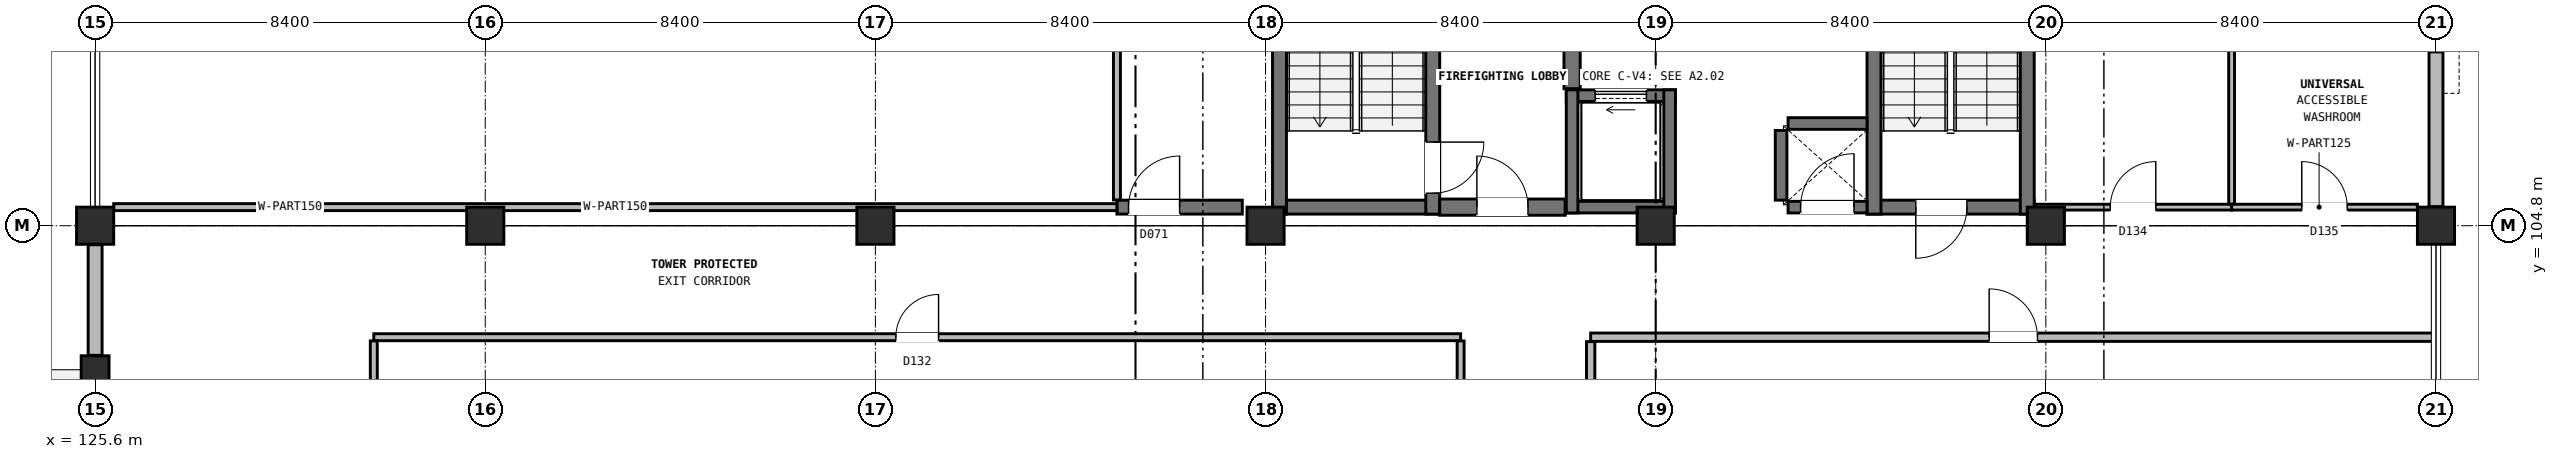
"""IFC4 building model, lengths in metres.
Left out: names, types, materials, properties, quantities, classifications, styles, units other than length and angle.
Written with IfcOpenShell. Run it as: python <this file> out.ifc"""

import sys

from ifc_helpers import new_model, si_unit, direction, frame, frame_2d, origin, origin_2d, place, context, subcontext, project, spatial, rectangle, extrude, element, fill, save


model = new_model("IFC4")
c1 = context("Model", 3, precision=1e-05, world=origin(), true_north=direction((0.0, 1.0)))
c2 = subcontext(c1, "Body", "Model", "MODEL_VIEW")
j1 = project(units=[si_unit("LENGTHUNIT", "METRE"), si_unit("PLANEANGLEUNIT", "RADIAN")], contexts=[c1])
p1 = place(None, origin())
s1 = spatial("IfcSite", under=j1, at=p1, CompositionType="ELEMENT")
p2 = place(p1, origin())
s2 = spatial("IfcBuilding", under=s1, at=p2, CompositionType="ELEMENT")
p3 = place(p2, origin())
s3 = spatial("IfcBuildingStorey", under=s2, at=p3, CompositionType="ELEMENT", Elevation=0.0)
for number, where, z_axis, x_axis in (
    (1, (125.6, 104.8, 0.0), (0.0, 0.0, 1.0), (1.0, 0.0, 0.0)),
    (2, (134.0, 104.8, 0.0), (0.0, 0.0, 1.0), (1.0, 0.0, 0.0)),
    (3, (142.4, 104.8, 0.0), (0.0, 0.0, 1.0), (1.0, 0.0, 0.0)),
    (4, (150.8, 104.8, 0.0), (0.0, 0.0, 1.0), (1.0, 0.0, 0.0)),
    (5, (159.2, 104.8, 0.0), (0.0, 0.0, 1.0), (1.0, 0.0, 0.0)),
    (6, (167.6, 104.8, 0.0), (0.0, 0.0, 1.0), (1.0, 0.0, 0.0)),
    (7, (176.0, 104.8, 0.0), (0.0, 0.0, 1.0), (1.0, 0.0, 0.0)),
):
    element("IfcColumn", number, at=place(p3, frame(where, z_axis=z_axis, x_axis=x_axis)), inside=s3, PredefinedType="COLUMN", context=c2, shape_type="SweptSolid", body=[
        extrude(rectangle(XDim=0.8, YDim=0.8, at=origin_2d()), origin(), (0.0, 0.0, 1.0), 4.8),
    ])
p4 = place(p3, frame((125.6, 101.7, 0.0), z_axis=(0.0, 0.0, 1.0), x_axis=(1.0, 0.0, 0.0)))
e8 = element("IfcColumn", 8, at=p4, inside=s3, PredefinedType="COLUMN", context=c2, shape_type="SweptSolid", body=[
    extrude(rectangle(XDim=0.6, YDim=0.6, at=origin_2d()), origin(), (0.0, 0.0, 1.0), 4.8),
])
p5 = place(p3, frame((176.0, 105.21, 0.0), z_axis=(0.0, 0.0, 1.0), x_axis=(0.0, 1.0, 0.0)))
e9 = element("IfcWall", 9, at=p5, inside=s3, PredefinedType="SOLIDWALL", context=c2, shape_type="SweptSolid", body=[
    extrude(rectangle(XDim=7.98, YDim=0.3, at=frame_2d((3.99, 0.0))), origin(), (0.0, 0.0, 1.0), 4.05),
])
p6 = place(p5, frame((3.315, 0.0, 0.9)))
e10 = element("IfcOpeningElement", 10, at=p6, cuts=e9, PredefinedType="OPENING", context=c2, shape_type="SweptSolid", body=[
    extrude(rectangle(XDim=1.35, YDim=1.8, at=frame_2d((0.675, 0.9))), frame((0.0, 0.16, 0.0), z_axis=(0.0, -1.0, 0.0), x_axis=(1.0, 0.0, 0.0)), (0.0, 0.0, 1.0), 0.32),
])
p7 = place(p3, frame((125.6, 104.39, 0.0), z_axis=(0.0, 0.0, 1.0), x_axis=(0.0, -1.0, 0.0)))
e11 = element("IfcWall", 11, at=p7, inside=s3, PredefinedType="SOLIDWALL", context=c2, shape_type="SweptSolid", body=[
    extrude(rectangle(XDim=2.38, YDim=0.3, at=frame_2d((1.19, 0.0))), origin(), (0.0, 0.0, 1.0), 4.05),
])
p8 = place(p3, frame((150.95, 105.2, 0.0), z_axis=(0.0, 0.0, 1.0), x_axis=(1.0, 0.0, 0.0)))
e12 = element("IfcWall", 12, at=p8, inside=s3, PredefinedType="SHEAR", context=c2, shape_type="SweptSolid", body=[
    extrude(rectangle(XDim=3.6, YDim=0.3, at=frame_2d((1.8, 0.0))), origin(), (0.0, 0.0, 1.0), 4.8),
])
p9 = place(p3, frame((151.1, 105.05, 0.0), z_axis=(0.0, 0.0, 1.0), x_axis=(0.0, 1.0, 0.0)))
e13 = element("IfcWall", 13, at=p9, inside=s3, PredefinedType="SHEAR", context=c2, shape_type="SweptSolid", body=[
    extrude(rectangle(XDim=8.3, YDim=0.3, at=frame_2d((4.15, 0.0))), origin(), (0.0, 0.0, 1.0), 4.8),
])
p10 = place(p3, frame((154.4, 105.05, 0.0), z_axis=(0.0, 0.0, 1.0), x_axis=(0.0, 1.0, 0.0)))
e14 = element("IfcWall", 14, at=p10, inside=s3, PredefinedType="SHEAR", context=c2, shape_type="SweptSolid", body=[
    extrude(rectangle(XDim=8.3, YDim=0.3, at=frame_2d((4.15, 0.0))), origin(), (0.0, 0.0, 1.0), 4.8),
])
p11 = place(p10, frame((0.45, 0.0, 0.0)))
e15 = element("IfcOpeningElement", 15, at=p11, cuts=e14, PredefinedType="OPENING", context=c2, shape_type="SweptSolid", body=[
    extrude(rectangle(XDim=1.1, YDim=2.2, at=frame_2d((0.55, 1.1))), frame((0.0, 0.16, 0.0), z_axis=(0.0, -1.0, 0.0), x_axis=(1.0, 0.0, 0.0)), (0.0, 0.0, 1.0), 0.32),
])
p12 = place(p3, frame((163.75, 105.2, 0.0), z_axis=(0.0, 0.0, 1.0), x_axis=(1.0, 0.0, 0.0)))
e16 = element("IfcWall", 16, at=p12, inside=s3, PredefinedType="SHEAR", context=c2, shape_type="SweptSolid", body=[
    extrude(rectangle(XDim=3.6, YDim=0.3, at=frame_2d((1.8, 0.0))), origin(), (0.0, 0.0, 1.0), 4.8),
])
p13 = place(p12, frame((1.05, 0.0, 0.0)))
e17 = element("IfcOpeningElement", 17, at=p13, cuts=e16, PredefinedType="OPENING", context=c2, shape_type="SweptSolid", body=[
    extrude(rectangle(XDim=1.1, YDim=2.2, at=frame_2d((0.55, 1.1))), frame((0.0, 0.16, 0.0), z_axis=(0.0, -1.0, 0.0), x_axis=(1.0, 0.0, 0.0)), (0.0, 0.0, 1.0), 0.32),
])
for number, where, z_axis, x_axis in (
    (18, (163.9, 105.05, 0.0), (0.0, 0.0, 1.0), (0.0, 1.0, 0.0)),
    (19, (167.2, 105.05, 0.0), (0.0, 0.0, 1.0), (0.0, 1.0, 0.0)),
):
    element("IfcWall", number, at=place(p3, frame(where, z_axis=z_axis, x_axis=x_axis)), inside=s3, PredefinedType="SHEAR", context=c2, shape_type="SweptSolid", body=[
        extrude(rectangle(XDim=8.3, YDim=0.3, at=frame_2d((4.15, 0.0))), origin(), (0.0, 0.0, 1.0), 4.8),
    ])
p14 = place(p3, frame((157.275, 105.2, 0.0), z_axis=(0.0, 0.0, 1.0), x_axis=(1.0, 0.0, 0.0)))
e20 = element("IfcWall", 20, at=p14, inside=s3, PredefinedType="SOLIDWALL", context=c2, shape_type="SweptSolid", body=[
    extrude(rectangle(XDim=2.35, YDim=0.25, at=frame_2d((1.175, 0.0))), origin(), (0.0, 0.0, 1.0), 4.48),
])
p15 = place(p3, frame((157.275, 107.6, 0.0), z_axis=(0.0, 0.0, 1.0), x_axis=(1.0, 0.0, 0.0)))
e21 = element("IfcWall", 21, at=p15, inside=s3, PredefinedType="SOLIDWALL", context=c2, shape_type="SweptSolid", body=[
    extrude(rectangle(XDim=2.35, YDim=0.25, at=frame_2d((1.175, 0.0))), origin(), (0.0, 0.0, 1.0), 4.48),
])
p16 = place(p15, frame((0.625, 0.0, 0.0)))
e22 = element("IfcOpeningElement", 22, at=p16, cuts=e21, PredefinedType="OPENING", context=c2, shape_type="SweptSolid", body=[
    extrude(rectangle(XDim=1.1, YDim=2.2, at=frame_2d((0.55, 1.1))), frame((0.0, 0.135, 0.0), z_axis=(0.0, -1.0, 0.0), x_axis=(1.0, 0.0, 0.0)), (0.0, 0.0, 1.0), 0.27),
])
for number, where, z_axis, x_axis in (
    (23, (157.4, 105.075, 0.0), (0.0, 0.0, 1.0), (0.0, 1.0, 0.0)),
    (24, (159.5, 105.075, 0.0), (0.0, 0.0, 1.0), (0.0, 1.0, 0.0)),
):
    element("IfcWall", number, at=place(p3, frame(where, z_axis=z_axis, x_axis=x_axis)), inside=s3, PredefinedType="SOLIDWALL", context=c2, shape_type="SweptSolid", body=[
        extrude(rectangle(XDim=2.65, YDim=0.25, at=frame_2d((1.325, 0.0))), origin(), (0.0, 0.0, 1.0), 4.48),
    ])
p17 = place(p3, frame((157.4, 107.75, 0.0), z_axis=(0.0, 0.0, 1.0), x_axis=(0.0, 1.0, 0.0)))
e25 = element("IfcWall", 25, at=p17, inside=s3, PredefinedType="SHEAR", context=c2, shape_type="SweptSolid", body=[
    extrude(rectangle(XDim=2.9, YDim=0.35, at=frame_2d((1.45, 0.0))), origin(), (0.0, 0.0, 1.0), 4.48),
])
p18 = place(p3, frame((154.55, 105.2, 0.0), z_axis=(0.0, 0.0, 1.0), x_axis=(1.0, 0.0, 0.0)))
e26 = element("IfcWall", 26, at=p18, inside=s3, PredefinedType="SHEAR", context=c2, shape_type="SweptSolid", body=[
    extrude(rectangle(XDim=2.7, YDim=0.35, at=frame_2d((1.35, 0.0))), origin(), (0.0, 0.0, 1.0), 4.48),
])
p19 = place(p18, frame((0.8, 0.0, 0.0)))
e27 = element("IfcOpeningElement", 27, at=p19, cuts=e26, PredefinedType="OPENING", context=c2, shape_type="SweptSolid", body=[
    extrude(rectangle(XDim=1.1, YDim=2.2, at=frame_2d((0.55, 1.1))), frame((0.0, 0.185, 0.0), z_axis=(0.0, -1.0, 0.0), x_axis=(1.0, 0.0, 0.0)), (0.0, 0.0, 1.0), 0.37),
])
p20 = place(p3, frame((161.9, 105.35, 0.0), z_axis=(0.0, 0.0, 1.0), x_axis=(0.0, 1.0, 0.0)))
e28 = element("IfcWall", 28, at=p20, inside=s3, PredefinedType="SOLIDWALL", context=c2, shape_type="SweptSolid", body=[
    extrude(rectangle(XDim=1.5, YDim=0.25, at=frame_2d((0.75, 0.0))), origin(), (0.0, 0.0, 1.0), 4.48),
])
p21 = place(p3, frame((162.05, 107.0, 0.0), z_axis=(0.0, 0.0, 1.0), x_axis=(1.0, 0.0, 0.0)))
e29 = element("IfcWall", 29, at=p21, inside=s3, PredefinedType="SOLIDWALL", context=c2, shape_type="SweptSolid", body=[
    extrude(rectangle(XDim=1.7, YDim=0.25, at=frame_2d((0.85, 0.0))), origin(), (0.0, 0.0, 1.0), 4.48),
])
p22 = place(p3, frame((162.05, 105.2, 0.0), z_axis=(0.0, 0.0, 1.0), x_axis=(1.0, 0.0, 0.0)))
e30 = element("IfcWall", 30, at=p22, inside=s3, PredefinedType="SOLIDWALL", context=c2, shape_type="SweptSolid", body=[
    extrude(rectangle(XDim=1.7, YDim=0.25, at=frame_2d((0.85, 0.0))), origin(), (0.0, 0.0, 1.0), 4.48),
])
p23 = place(p22, frame((0.27, 0.0, 0.0)))
e31 = element("IfcOpeningElement", 31, at=p23, cuts=e30, PredefinedType="OPENING", context=c2, shape_type="SweptSolid", body=[
    extrude(rectangle(XDim=1.15, YDim=2.2, at=frame_2d((0.575, 1.1))), frame((0.0, 0.135, 0.0), z_axis=(0.0, -1.0, 0.0), x_axis=(1.0, 0.0, 0.0)), (0.0, 0.0, 1.0), 0.27),
])
p24 = place(p3, frame((147.6, 105.2, 0.0), z_axis=(0.0, 0.0, 1.0), x_axis=(1.0, 0.0, 0.0)))
e32 = element("IfcWall", 32, at=p24, inside=s3, PredefinedType="SHEAR", context=c2, shape_type="SweptSolid", body=[
    extrude(rectangle(XDim=2.7, YDim=0.3, at=frame_2d((1.35, 0.0))), origin(), (0.0, 0.0, 1.0), 4.48),
])
p25 = place(p24, frame((0.25, 0.0, 0.0)))
e33 = element("IfcOpeningElement", 33, at=p25, cuts=e32, PredefinedType="OPENING", context=c2, shape_type="SweptSolid", body=[
    extrude(rectangle(XDim=1.1, YDim=2.2, at=frame_2d((0.55, 1.1))), frame((0.0, 0.16, 0.0), z_axis=(0.0, -1.0, 0.0), x_axis=(1.0, 0.0, 0.0)), (0.0, 0.0, 1.0), 0.32),
])
p26 = place(p3, frame((147.6, 105.355, 0.0), z_axis=(0.0, 0.0, 1.0), x_axis=(0.0, 1.0, 0.0)))
e34 = element("IfcWall", 34, at=p26, inside=s3, PredefinedType="PARTITIONING", context=c2, shape_type="SweptSolid", body=[
    extrude(rectangle(XDim=16.89, YDim=0.15, at=frame_2d((8.445, 0.0))), origin(), (0.0, 0.0, 1.0), 4.465),
])
p27 = place(p26, frame((7.525, 0.0, 0.0)))
e35 = element("IfcOpeningElement", 35, at=p27, cuts=e34, PredefinedType="OPENING", context=c2, shape_type="SweptSolid", body=[
    extrude(rectangle(XDim=1.84, YDim=2.38, at=frame_2d((0.92, 1.19))), frame((0.0, 0.085, 0.0), z_axis=(0.0, -1.0, 0.0), x_axis=(1.0, 0.0, 0.0)), (0.0, 0.0, 1.0), 0.17),
])
p28 = place(p3, frame((131.6, 102.4, 0.0), z_axis=(0.0, 0.0, 1.0), x_axis=(1.0, 0.0, 0.0)))
e36 = element("IfcWall", 36, at=p28, inside=s3, PredefinedType="PARTITIONING", context=c2, shape_type="SweptSolid", body=[
    extrude(rectangle(XDim=23.4, YDim=0.15, at=frame_2d((11.7, 0.0))), origin(), (0.0, 0.0, 1.0), 4.465),
])
p29 = place(p28, frame((11.24, 0.0, 0.0)))
e37 = element("IfcOpeningElement", 37, at=p29, cuts=e36, PredefinedType="OPENING", context=c2, shape_type="SweptSolid", body=[
    extrude(rectangle(XDim=0.92, YDim=2.1, at=frame_2d((0.46, 1.05))), frame((0.0, 0.085, 0.0), z_axis=(0.0, -1.0, 0.0), x_axis=(1.0, 0.0, 0.0)), (0.0, 0.0, 1.0), 0.17),
])
p30 = place(p3, frame((157.8, 102.4, 0.0), z_axis=(0.0, 0.0, 1.0), x_axis=(1.0, 0.0, 0.0)))
e38 = element("IfcWall", 38, at=p30, inside=s3, PredefinedType="PARTITIONING", context=c2, shape_type="SweptSolid", body=[
    extrude(rectangle(XDim=18.2, YDim=0.18, at=frame_2d((9.1, 0.0))), origin(), (0.0, 0.0, 1.0), 4.465),
])
p31 = place(p30, frame((8.58, 0.0, 0.0)))
e39 = element("IfcOpeningElement", 39, at=p31, cuts=e38, PredefinedType="OPENING", context=c2, shape_type="SweptSolid", body=[
    extrude(rectangle(XDim=1.04, YDim=2.15, at=frame_2d((0.52, 1.075))), frame((0.0, 0.1, 0.0), z_axis=(0.0, -1.0, 0.0), x_axis=(1.0, 0.0, 0.0)), (0.0, 0.0, 1.0), 0.2),
])
p32 = place(p3, frame((126.0, 105.2, 0.0), z_axis=(0.0, 0.0, 1.0), x_axis=(1.0, 0.0, 0.0)))
e40 = element("IfcWall", 40, at=p32, inside=s3, PredefinedType="PARTITIONING", context=c2, shape_type="SweptSolid", body=[
    extrude(rectangle(XDim=21.6, YDim=0.15, at=frame_2d((10.8, 0.0))), origin(), (0.0, 0.0, 1.0), 4.045),
])
p33 = place(p3, frame((167.355, 105.2, 0.0), z_axis=(0.0, 0.0, 1.0), x_axis=(1.0, 0.0, 0.0)))
e41 = element("IfcWall", 41, at=p33, inside=s3, PredefinedType="PARTITIONING", context=c2, shape_type="SweptSolid", body=[
    extrude(rectangle(XDim=4.245, YDim=0.125, at=frame_2d((2.123, 0.0))), origin(), (0.0, 0.0, 1.0), 4.045),
])
p34 = place(p33, frame((1.633, 0.0, 0.0)))
e42 = element("IfcOpeningElement", 42, at=p34, cuts=e41, PredefinedType="OPENING", context=c2, shape_type="SweptSolid", body=[
    extrude(rectangle(XDim=0.98, YDim=2.1, at=frame_2d((0.49, 1.05))), frame((0.0, 0.073, 0.0), z_axis=(0.0, -1.0, 0.0), x_axis=(1.0, 0.0, 0.0)), (0.0, 0.0, 1.0), 0.145),
])
p35 = place(p3, frame((171.6, 105.2, 0.0), z_axis=(0.0, 0.0, 1.0), x_axis=(1.0, 0.0, 0.0)))
e43 = element("IfcWall", 43, at=p35, inside=s3, PredefinedType="PARTITIONING", context=c2, shape_type="SweptSolid", body=[
    extrude(rectangle(XDim=4.0, YDim=0.125, at=frame_2d((2.0, 0.0))), origin(), (0.0, 0.0, 1.0), 4.045),
])
p36 = place(p35, frame((1.51, 0.0, 0.0)))
e44 = element("IfcOpeningElement", 44, at=p36, cuts=e43, PredefinedType="OPENING", context=c2, shape_type="SweptSolid", body=[
    extrude(rectangle(XDim=0.98, YDim=2.1, at=frame_2d((0.49, 1.05))), frame((0.0, 0.073, 0.0), z_axis=(0.0, -1.0, 0.0), x_axis=(1.0, 0.0, 0.0)), (0.0, 0.0, 1.0), 0.145),
])
p37 = place(p3, frame((131.6, 94.0, 0.0), z_axis=(0.0, 0.0, 1.0), x_axis=(0.0, 1.0, 0.0)))
e45 = element("IfcWall", 45, at=p37, inside=s3, PredefinedType="PARTITIONING", context=c2, shape_type="SweptSolid", body=[
    extrude(rectangle(XDim=8.32, YDim=0.15, at=frame_2d((4.16, 0.0))), origin(), (0.0, 0.0, 1.0), 4.465),
])
p38 = place(p3, frame((155.0, 87.2, 0.0), z_axis=(0.0, 0.0, 1.0), x_axis=(0.0, 1.0, 0.0)))
e46 = element("IfcWall", 46, at=p38, inside=s3, PredefinedType="PARTITIONING", context=c2, shape_type="SweptSolid", body=[
    extrude(rectangle(XDim=15.12, YDim=0.15, at=frame_2d((7.56, 0.0))), origin(), (0.0, 0.0, 1.0), 4.465),
])
p39 = place(p3, frame((157.8, 87.2, 0.0), z_axis=(0.0, 0.0, 1.0), x_axis=(0.0, 1.0, 0.0)))
e47 = element("IfcWall", 47, at=p39, inside=s3, PredefinedType="PARTITIONING", context=c2, shape_type="SweptSolid", body=[
    extrude(rectangle(XDim=15.105, YDim=0.18, at=frame_2d((7.552, 0.0))), origin(), (0.0, 0.0, 1.0), 4.465),
])
p40 = place(p3, frame((171.6, 105.268, 0.0), z_axis=(0.0, 0.0, 1.0), x_axis=(0.0, 1.0, 0.0)))
e48 = element("IfcWall", 48, at=p40, inside=s3, PredefinedType="PARTITIONING", context=c2, shape_type="SweptSolid", body=[
    extrude(rectangle(XDim=16.978, YDim=0.125, at=frame_2d((8.489, 0.0))), origin(), (0.0, 0.0, 1.0), 4.465),
])
p41 = place(p11, frame((1.1, 0.0, 0.0), z_axis=(0.0, 0.0, 1.0), x_axis=(-1.0, 0.0, 0.0)))
e49 = element("IfcDoor", 49, at=p41, inside=s3, OperationType="SINGLE_SWING_RIGHT", PredefinedType="DOOR", context=c2, shape_type="SweptSolid", body=[
    extrude(rectangle(XDim=1.1, YDim=2.2, at=frame_2d((0.55, 1.1))), frame((0.0, 0.025, 0.0), z_axis=(0.0, -1.0, 0.0), x_axis=(1.0, 0.0, 0.0)), (0.0, 0.0, 1.0), 0.05),
])
fill(e15, e49)
p42 = place(p13, frame((1.1, 0.0, 0.0), z_axis=(0.0, 0.0, 1.0), x_axis=(-1.0, 0.0, 0.0)))
e50 = element("IfcDoor", 50, at=p42, inside=s3, OperationType="SINGLE_SWING_LEFT", PredefinedType="DOOR", context=c2, shape_type="SweptSolid", body=[
    extrude(rectangle(XDim=1.1, YDim=2.2, at=frame_2d((0.55, 1.1))), frame((0.0, 0.025, 0.0), z_axis=(0.0, -1.0, 0.0), x_axis=(1.0, 0.0, 0.0)), (0.0, 0.0, 1.0), 0.05),
])
fill(e17, e50)
p43 = place(p16, origin())
e51 = element("IfcDoor", 51, at=p43, inside=s3, OperationType="SLIDING_TO_LEFT", PredefinedType="DOOR", context=c2, shape_type="SweptSolid", body=[
    extrude(rectangle(XDim=1.1, YDim=2.2, at=frame_2d((0.55, 1.1))), frame((0.0, 0.025, 0.0), z_axis=(0.0, -1.0, 0.0), x_axis=(1.0, 0.0, 0.0)), (0.0, 0.0, 1.0), 0.05),
])
fill(e22, e51)
p44 = place(p19, origin())
e52 = element("IfcDoor", 52, at=p44, inside=s3, OperationType="SINGLE_SWING_LEFT", PredefinedType="DOOR", context=c2, shape_type="SweptSolid", body=[
    extrude(rectangle(XDim=1.1, YDim=2.2, at=frame_2d((0.55, 1.1))), frame((0.0, 0.025, 0.0), z_axis=(0.0, -1.0, 0.0), x_axis=(1.0, 0.0, 0.0)), (0.0, 0.0, 1.0), 0.05),
])
fill(e27, e52)
p45 = place(p23, origin())
e53 = element("IfcDoor", 53, at=p45, inside=s3, OperationType="SINGLE_SWING_RIGHT", PredefinedType="DOOR", context=c2, shape_type="SweptSolid", body=[
    extrude(rectangle(XDim=1.15, YDim=2.2, at=frame_2d((0.575, 1.1))), frame((0.0, 0.025, 0.0), z_axis=(0.0, -1.0, 0.0), x_axis=(1.0, 0.0, 0.0)), (0.0, 0.0, 1.0), 0.05),
])
fill(e31, e53)
p46 = place(p25, origin())
e54 = element("IfcDoor", 54, at=p46, inside=s3, OperationType="SINGLE_SWING_RIGHT", PredefinedType="DOOR", context=c2, shape_type="SweptSolid", body=[
    extrude(rectangle(XDim=1.1, YDim=2.2, at=frame_2d((0.55, 1.1))), frame((0.0, 0.025, 0.0), z_axis=(0.0, -1.0, 0.0), x_axis=(1.0, 0.0, 0.0)), (0.0, 0.0, 1.0), 0.05),
])
fill(e33, e54)
p47 = place(p29, origin())
e55 = element("IfcDoor", 55, at=p47, inside=s3, OperationType="SINGLE_SWING_RIGHT", PredefinedType="DOOR", context=c2, shape_type="SweptSolid", body=[
    extrude(rectangle(XDim=0.92, YDim=2.1, at=frame_2d((0.46, 1.05))), frame((0.0, 0.025, 0.0), z_axis=(0.0, -1.0, 0.0), x_axis=(1.0, 0.0, 0.0)), (0.0, 0.0, 1.0), 0.05),
])
fill(e37, e55)
p48 = place(p31, origin())
e56 = element("IfcDoor", 56, at=p48, inside=s3, OperationType="SINGLE_SWING_LEFT", PredefinedType="DOOR", context=c2, shape_type="SweptSolid", body=[
    extrude(rectangle(XDim=1.04, YDim=2.15, at=frame_2d((0.52, 1.075))), frame((0.0, 0.025, 0.0), z_axis=(0.0, -1.0, 0.0), x_axis=(1.0, 0.0, 0.0)), (0.0, 0.0, 1.0), 0.05),
])
fill(e39, e56)
p49 = place(p34, origin())
e57 = element("IfcDoor", 57, at=p49, inside=s3, OperationType="SINGLE_SWING_RIGHT", PredefinedType="DOOR", context=c2, shape_type="SweptSolid", body=[
    extrude(rectangle(XDim=0.98, YDim=2.1, at=frame_2d((0.49, 1.05))), frame((0.0, 0.025, 0.0), z_axis=(0.0, -1.0, 0.0), x_axis=(1.0, 0.0, 0.0)), (0.0, 0.0, 1.0), 0.05),
])
fill(e42, e57)
p50 = place(p36, origin())
e58 = element("IfcDoor", 58, at=p50, inside=s3, OperationType="SINGLE_SWING_LEFT", PredefinedType="DOOR", context=c2, shape_type="SweptSolid", body=[
    extrude(rectangle(XDim=0.98, YDim=2.1, at=frame_2d((0.49, 1.05))), frame((0.0, 0.025, 0.0), z_axis=(0.0, -1.0, 0.0), x_axis=(1.0, 0.0, 0.0)), (0.0, 0.0, 1.0), 0.05),
])
fill(e44, e58)
save(model, sys.argv[1])
